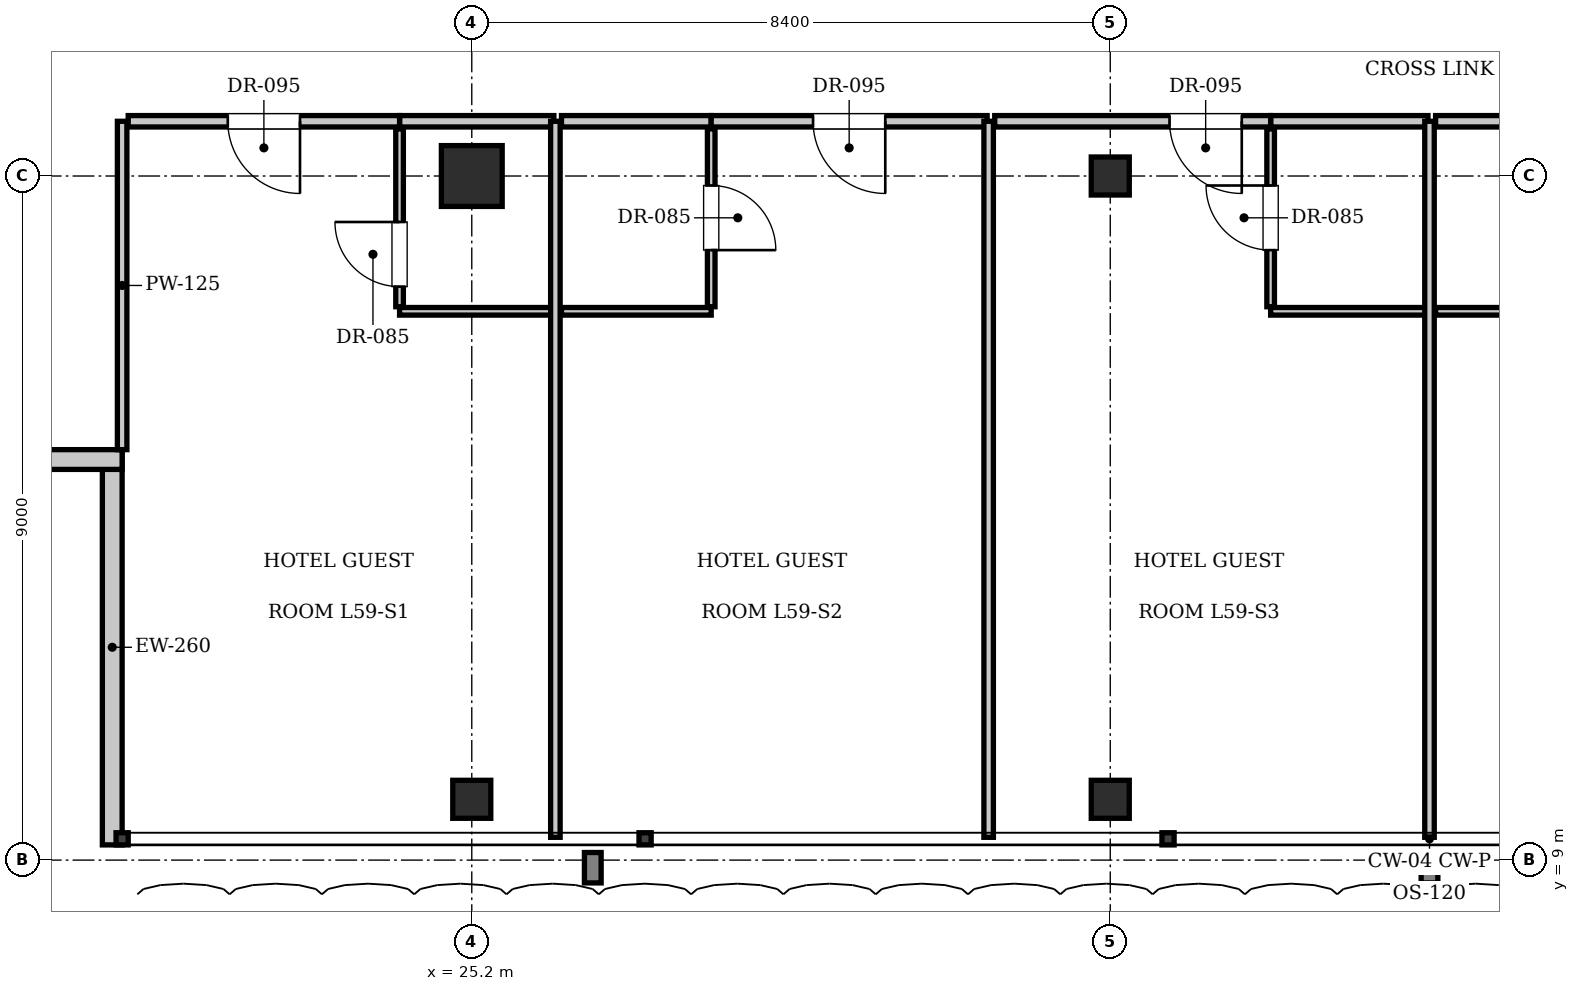
"""IFC4 building model, lengths in metres.
Left out: names, types, materials, properties, quantities, classifications, styles, units other than length and angle.
Written with IfcOpenShell. Run it as: python <this file> out.ifc"""

import sys

from ifc_helpers import new_model, si_unit, direction, frame, frame_2d, origin, origin_2d, place, context, subcontext, project, spatial, rectangle, i_section, extrude, element, fill, save


model = new_model("IFC4")
c1 = context("Model", 3, precision=1e-05, world=origin(), true_north=direction((0.0, 1.0)))
c2 = subcontext(c1, "Body", "Model", "MODEL_VIEW")
j1 = project(units=[si_unit("LENGTHUNIT", "METRE"), si_unit("PLANEANGLEUNIT", "RADIAN")], contexts=[c1])
p1 = place(None, origin())
s1 = spatial("IfcSite", under=j1, at=p1, CompositionType="ELEMENT")
p2 = place(p1, origin())
s2 = spatial("IfcBuilding", under=s1, at=p2, CompositionType="ELEMENT")
p3 = place(p2, frame((0.0, 0.0, 243.25)))
s3 = spatial("IfcBuildingStorey", under=s2, at=p3, CompositionType="ELEMENT", Elevation=243.25)
p4 = place(p3, frame((25.2, 18.0, 0.0), z_axis=(0.0, 0.0, 1.0), x_axis=(1.0, 0.0, 0.0)))
e1 = element("IfcColumn", 1, at=p4, inside=s3, PredefinedType="COLUMN", context=c2, shape_type="SweptSolid", body=[
    extrude(rectangle(XDim=0.8, YDim=0.8, at=origin_2d()), origin(), (0.0, 0.0, 1.0), 3.85),
])
for number, where, z_axis, x_axis in (
    (2, (33.6, 18.0, 0.0), (0.0, 0.0, 1.0), (1.0, 0.0, 0.0)),
    (3, (25.2, 9.8, 0.0), (0.0, 0.0, 1.0), (1.0, 0.0, 0.0)),
    (4, (33.6, 9.8, 0.0), (0.0, 0.0, 1.0), (1.0, 0.0, 0.0)),
):
    element("IfcColumn", number, at=place(p3, frame(where, z_axis=z_axis, x_axis=x_axis)), inside=s3, PredefinedType="COLUMN", context=c2, shape_type="SweptSolid", body=[
        extrude(i_section(OverallWidth=0.5, OverallDepth=0.5, WebThickness=0.022, FlangeThickness=0.032, at=origin_2d()), origin(), (0.0, 0.0, 1.0), 3.85),
    ])
p5 = place(p3, frame((20.47, 9.2, 0.0), z_axis=(0.0, 0.0, 1.0), x_axis=(0.0, 1.0, 0.0)))
e5 = element("IfcWall", 5, at=p5, inside=s3, PredefinedType="SOLIDWALL", context=c2, shape_type="SweptSolid", body=[
    extrude(rectangle(XDim=5.2, YDim=0.26, at=frame_2d((2.6, 0.0))), origin(), (0.0, 0.0, 1.0), 3.61),
])
p6 = place(p3, frame((20.6, 14.27, 0.0), z_axis=(0.0, 0.0, 1.0), x_axis=(-1.0, 0.0, 0.0)))
e6 = element("IfcWall", 6, at=p6, inside=s3, PredefinedType="SOLIDWALL", context=c2, shape_type="SweptSolid", body=[
    extrude(rectangle(XDim=5.2, YDim=0.26, at=frame_2d((2.6, 0.0))), origin(), (0.0, 0.0, 1.0), 3.61),
])
p7 = place(p6, frame((1.6, 0.0, 0.9)))
e7 = element("IfcOpeningElement", 7, at=p7, cuts=e6, PredefinedType="OPENING", context=c2, shape_type="SweptSolid", body=[
    extrude(rectangle(XDim=2.0, YDim=2.2, at=frame_2d((1.0, 1.1))), frame((0.0, 0.14, 0.0), z_axis=(0.0, -1.0, 0.0), x_axis=(1.0, 0.0, 0.0)), (0.0, 0.0, 1.0), 0.28),
])
p8 = place(p3, frame((20.6, 14.4, 0.0), z_axis=(0.0, 0.0, 1.0), x_axis=(0.0, 1.0, 0.0)))
e8 = element("IfcWall", 8, at=p8, inside=s3, PredefinedType="PARTITIONING", context=c2, shape_type="SweptSolid", body=[
    extrude(rectangle(XDim=4.32, YDim=0.125, at=frame_2d((2.16, 0.0))), origin(), (0.0, 0.0, 1.0), 3.61),
])
p9 = place(p3, frame((24.25, 18.72, 0.0), z_axis=(0.0, 0.0, 1.0), x_axis=(1.0, 0.0, 0.0)))
e9 = element("IfcWall", 9, at=p9, inside=s3, PredefinedType="PARTITIONING", context=c2, shape_type="SweptSolid", body=[
    extrude(rectangle(XDim=2.03, YDim=0.15, at=frame_2d((1.015, 0.0))), origin(), (0.0, 0.0, 1.0), 3.61),
])
p10 = place(p3, frame((24.25, 16.22, 0.0), z_axis=(0.0, 0.0, 1.0), x_axis=(1.0, 0.0, 0.0)))
e10 = element("IfcWall", 10, at=p10, inside=s3, PredefinedType="PARTITIONING", context=c2, shape_type="SweptSolid", body=[
    extrude(rectangle(XDim=2.01, YDim=0.1, at=frame_2d((1.005, 0.0))), origin(), (0.0, 0.0, 1.0), 3.61),
])
p11 = place(p3, frame((24.25, 16.28, 0.0), z_axis=(0.0, 0.0, 1.0), x_axis=(0.0, 1.0, 0.0)))
e11 = element("IfcWall", 11, at=p11, inside=s3, PredefinedType="PARTITIONING", context=c2, shape_type="SweptSolid", body=[
    extrude(rectangle(XDim=2.34, YDim=0.1, at=frame_2d((1.17, 0.0))), origin(), (0.0, 0.0, 1.0), 3.61),
])
p12 = place(p11, frame((0.265, 0.0, 0.0)))
e12 = element("IfcOpeningElement", 12, at=p12, cuts=e11, PredefinedType="OPENING", context=c2, shape_type="SweptSolid", body=[
    extrude(rectangle(XDim=0.85, YDim=2.1, at=frame_2d((0.425, 1.05))), frame((0.0, 0.06, 0.0), z_axis=(0.0, -1.0, 0.0), x_axis=(1.0, 0.0, 0.0)), (0.0, 0.0, 1.0), 0.12),
])
p13 = place(p3, frame((20.68, 18.72, 0.0), z_axis=(0.0, 0.0, 1.0), x_axis=(1.0, 0.0, 0.0)))
e13 = element("IfcWall", 13, at=p13, inside=s3, PredefinedType="PARTITIONING", context=c2, shape_type="SweptSolid", body=[
    extrude(rectangle(XDim=3.57, YDim=0.15, at=frame_2d((1.785, 0.0))), origin(), (0.0, 0.0, 1.0), 3.61),
])
p14 = place(p13, frame((1.31, 0.0, 0.0)))
e14 = element("IfcOpeningElement", 14, at=p14, cuts=e13, PredefinedType="OPENING", context=c2, shape_type="SweptSolid", body=[
    extrude(rectangle(XDim=0.95, YDim=2.15, at=frame_2d((0.475, 1.075))), frame((0.0, 0.085, 0.0), z_axis=(0.0, -1.0, 0.0), x_axis=(1.0, 0.0, 0.0)), (0.0, 0.0, 1.0), 0.17),
])
p15 = place(p3, frame((26.3, 9.3, 0.0), z_axis=(0.0, 0.0, 1.0), x_axis=(0.0, 1.0, 0.0)))
e15 = element("IfcWall", 15, at=p15, inside=s3, PredefinedType="PARTITIONING", context=c2, shape_type="SweptSolid", body=[
    extrude(rectangle(XDim=9.42, YDim=0.125, at=frame_2d((4.71, 0.0))), origin(), (0.0, 0.0, 1.0), 3.61),
])
p16 = place(p3, frame((26.38, 18.72, 0.0), z_axis=(0.0, 0.0, 1.0), x_axis=(1.0, 0.0, 0.0)))
e16 = element("IfcWall", 16, at=p16, inside=s3, PredefinedType="PARTITIONING", context=c2, shape_type="SweptSolid", body=[
    extrude(rectangle(XDim=1.97, YDim=0.15, at=frame_2d((0.985, 0.0))), origin(), (0.0, 0.0, 1.0), 3.61),
])
p17 = place(p3, frame((26.38, 16.22, 0.0), z_axis=(0.0, 0.0, 1.0), x_axis=(1.0, 0.0, 0.0)))
e17 = element("IfcWall", 17, at=p17, inside=s3, PredefinedType="PARTITIONING", context=c2, shape_type="SweptSolid", body=[
    extrude(rectangle(XDim=1.97, YDim=0.1, at=frame_2d((0.985, 0.0))), origin(), (0.0, 0.0, 1.0), 3.61),
])
p18 = place(p3, frame((28.35, 16.28, 0.0), z_axis=(0.0, 0.0, 1.0), x_axis=(0.0, 1.0, 0.0)))
e18 = element("IfcWall", 18, at=p18, inside=s3, PredefinedType="PARTITIONING", context=c2, shape_type="SweptSolid", body=[
    extrude(rectangle(XDim=2.34, YDim=0.1, at=frame_2d((1.17, 0.0))), origin(), (0.0, 0.0, 1.0), 3.61),
])
p19 = place(p18, frame((0.745, 0.0, 0.0)))
e19 = element("IfcOpeningElement", 19, at=p19, cuts=e18, PredefinedType="OPENING", context=c2, shape_type="SweptSolid", body=[
    extrude(rectangle(XDim=0.85, YDim=2.1, at=frame_2d((0.425, 1.05))), frame((0.0, 0.06, 0.0), z_axis=(0.0, -1.0, 0.0), x_axis=(1.0, 0.0, 0.0)), (0.0, 0.0, 1.0), 0.12),
])
p20 = place(p3, frame((28.35, 18.72, 0.0), z_axis=(0.0, 0.0, 1.0), x_axis=(1.0, 0.0, 0.0)))
e20 = element("IfcWall", 20, at=p20, inside=s3, PredefinedType="PARTITIONING", context=c2, shape_type="SweptSolid", body=[
    extrude(rectangle(XDim=3.63, YDim=0.15, at=frame_2d((1.815, 0.0))), origin(), (0.0, 0.0, 1.0), 3.61),
])
p21 = place(p20, frame((1.34, 0.0, 0.0)))
e21 = element("IfcOpeningElement", 21, at=p21, cuts=e20, PredefinedType="OPENING", context=c2, shape_type="SweptSolid", body=[
    extrude(rectangle(XDim=0.95, YDim=2.15, at=frame_2d((0.475, 1.075))), frame((0.0, 0.085, 0.0), z_axis=(0.0, -1.0, 0.0), x_axis=(1.0, 0.0, 0.0)), (0.0, 0.0, 1.0), 0.17),
])
p22 = place(p3, frame((32.0, 9.3, 0.0), z_axis=(0.0, 0.0, 1.0), x_axis=(0.0, 1.0, 0.0)))
e22 = element("IfcWall", 22, at=p22, inside=s3, PredefinedType="PARTITIONING", context=c2, shape_type="SweptSolid", body=[
    extrude(rectangle(XDim=9.42, YDim=0.125, at=frame_2d((4.71, 0.0))), origin(), (0.0, 0.0, 1.0), 3.61),
])
p23 = place(p3, frame((35.71, 18.72, 0.0), z_axis=(0.0, 0.0, 1.0), x_axis=(1.0, 0.0, 0.0)))
e23 = element("IfcWall", 23, at=p23, inside=s3, PredefinedType="PARTITIONING", context=c2, shape_type="SweptSolid", body=[
    extrude(rectangle(XDim=2.07, YDim=0.15, at=frame_2d((1.035, 0.0))), origin(), (0.0, 0.0, 1.0), 3.61),
])
p24 = place(p3, frame((35.71, 16.22, 0.0), z_axis=(0.0, 0.0, 1.0), x_axis=(1.0, 0.0, 0.0)))
e24 = element("IfcWall", 24, at=p24, inside=s3, PredefinedType="PARTITIONING", context=c2, shape_type="SweptSolid", body=[
    extrude(rectangle(XDim=2.05, YDim=0.1, at=frame_2d((1.025, 0.0))), origin(), (0.0, 0.0, 1.0), 3.61),
])
p25 = place(p3, frame((35.71, 16.28, 0.0), z_axis=(0.0, 0.0, 1.0), x_axis=(0.0, 1.0, 0.0)))
e25 = element("IfcWall", 25, at=p25, inside=s3, PredefinedType="PARTITIONING", context=c2, shape_type="SweptSolid", body=[
    extrude(rectangle(XDim=2.34, YDim=0.1, at=frame_2d((1.17, 0.0))), origin(), (0.0, 0.0, 1.0), 3.61),
])
p26 = place(p25, frame((0.745, 0.0, 0.0)))
e26 = element("IfcOpeningElement", 26, at=p26, cuts=e25, PredefinedType="OPENING", context=c2, shape_type="SweptSolid", body=[
    extrude(rectangle(XDim=0.85, YDim=2.1, at=frame_2d((0.425, 1.05))), frame((0.0, 0.06, 0.0), z_axis=(0.0, -1.0, 0.0), x_axis=(1.0, 0.0, 0.0)), (0.0, 0.0, 1.0), 0.12),
])
p27 = place(p3, frame((32.08, 18.72, 0.0), z_axis=(0.0, 0.0, 1.0), x_axis=(1.0, 0.0, 0.0)))
e27 = element("IfcWall", 27, at=p27, inside=s3, PredefinedType="PARTITIONING", context=c2, shape_type="SweptSolid", body=[
    extrude(rectangle(XDim=3.63, YDim=0.15, at=frame_2d((1.815, 0.0))), origin(), (0.0, 0.0, 1.0), 3.61),
])
p28 = place(p27, frame((2.3, 0.0, 0.0)))
e28 = element("IfcOpeningElement", 28, at=p28, cuts=e27, PredefinedType="OPENING", context=c2, shape_type="SweptSolid", body=[
    extrude(rectangle(XDim=0.95, YDim=2.15, at=frame_2d((0.475, 1.075))), frame((0.0, 0.085, 0.0), z_axis=(0.0, -1.0, 0.0), x_axis=(1.0, 0.0, 0.0)), (0.0, 0.0, 1.0), 0.17),
])
p29 = place(p3, frame((37.8, 9.3, 0.0), z_axis=(0.0, 0.0, 1.0), x_axis=(0.0, 1.0, 0.0)))
e29 = element("IfcWall", 29, at=p29, inside=s3, PredefinedType="PARTITIONING", context=c2, shape_type="SweptSolid", body=[
    extrude(rectangle(XDim=9.42, YDim=0.125, at=frame_2d((4.71, 0.0))), origin(), (0.0, 0.0, 1.0), 3.3),
])
p30 = place(p3, frame((37.88, 18.72, 0.0), z_axis=(0.0, 0.0, 1.0), x_axis=(1.0, 0.0, 0.0)))
e30 = element("IfcWall", 30, at=p30, inside=s3, PredefinedType="PARTITIONING", context=c2, shape_type="SweptSolid", body=[
    extrude(rectangle(XDim=2.01, YDim=0.15, at=frame_2d((1.005, 0.0))), origin(), (0.0, 0.0, 1.0), 3.61),
])
p31 = place(p3, frame((37.88, 16.22, 0.0), z_axis=(0.0, 0.0, 1.0), x_axis=(1.0, 0.0, 0.0)))
e31 = element("IfcWall", 31, at=p31, inside=s3, PredefinedType="PARTITIONING", context=c2, shape_type="SweptSolid", body=[
    extrude(rectangle(XDim=2.01, YDim=0.1, at=frame_2d((1.005, 0.0))), origin(), (0.0, 0.0, 1.0), 3.61),
])
p32 = place(p12, origin())
e32 = element("IfcDoor", 32, at=p32, inside=s3, OperationType="SINGLE_SWING_RIGHT", PredefinedType="DOOR", context=c2, shape_type="SweptSolid", body=[
    extrude(rectangle(XDim=0.85, YDim=2.1, at=frame_2d((0.425, 1.05))), frame((0.0, 0.025, 0.0), z_axis=(0.0, -1.0, 0.0), x_axis=(1.0, 0.0, 0.0)), (0.0, 0.0, 1.0), 0.05),
])
fill(e12, e32)
p33 = place(p14, frame((0.95, 0.0, 0.0), z_axis=(0.0, 0.0, 1.0), x_axis=(-1.0, 0.0, 0.0)))
e33 = element("IfcDoor", 33, at=p33, inside=s3, OperationType="SINGLE_SWING_LEFT", PredefinedType="DOOR", context=c2, shape_type="SweptSolid", body=[
    extrude(rectangle(XDim=0.95, YDim=2.15, at=frame_2d((0.475, 1.075))), frame((0.0, 0.025, 0.0), z_axis=(0.0, -1.0, 0.0), x_axis=(1.0, 0.0, 0.0)), (0.0, 0.0, 1.0), 0.05),
])
fill(e14, e33)
p34 = place(p19, frame((0.85, 0.0, 0.0), z_axis=(0.0, 0.0, 1.0), x_axis=(-1.0, 0.0, 0.0)))
e34 = element("IfcDoor", 34, at=p34, inside=s3, OperationType="SINGLE_SWING_RIGHT", PredefinedType="DOOR", context=c2, shape_type="SweptSolid", body=[
    extrude(rectangle(XDim=0.85, YDim=2.1, at=frame_2d((0.425, 1.05))), frame((0.0, 0.025, 0.0), z_axis=(0.0, -1.0, 0.0), x_axis=(1.0, 0.0, 0.0)), (0.0, 0.0, 1.0), 0.05),
])
fill(e19, e34)
p35 = place(p21, frame((0.95, 0.0, 0.0), z_axis=(0.0, 0.0, 1.0), x_axis=(-1.0, 0.0, 0.0)))
e35 = element("IfcDoor", 35, at=p35, inside=s3, OperationType="SINGLE_SWING_LEFT", PredefinedType="DOOR", context=c2, shape_type="SweptSolid", body=[
    extrude(rectangle(XDim=0.95, YDim=2.15, at=frame_2d((0.475, 1.075))), frame((0.0, 0.025, 0.0), z_axis=(0.0, -1.0, 0.0), x_axis=(1.0, 0.0, 0.0)), (0.0, 0.0, 1.0), 0.05),
])
fill(e21, e35)
p36 = place(p26, origin())
e36 = element("IfcDoor", 36, at=p36, inside=s3, OperationType="SINGLE_SWING_RIGHT", PredefinedType="DOOR", context=c2, shape_type="SweptSolid", body=[
    extrude(rectangle(XDim=0.85, YDim=2.1, at=frame_2d((0.425, 1.05))), frame((0.0, 0.025, 0.0), z_axis=(0.0, -1.0, 0.0), x_axis=(1.0, 0.0, 0.0)), (0.0, 0.0, 1.0), 0.05),
])
fill(e26, e36)
p37 = place(p28, frame((0.95, 0.0, 0.0), z_axis=(0.0, 0.0, 1.0), x_axis=(-1.0, 0.0, 0.0)))
e37 = element("IfcDoor", 37, at=p37, inside=s3, OperationType="SINGLE_SWING_LEFT", PredefinedType="DOOR", context=c2, shape_type="SweptSolid", body=[
    extrude(rectangle(XDim=0.95, YDim=2.15, at=frame_2d((0.475, 1.075))), frame((0.0, 0.025, 0.0), z_axis=(0.0, -1.0, 0.0), x_axis=(1.0, 0.0, 0.0)), (0.0, 0.0, 1.0), 0.05),
])
fill(e28, e37)
save(model, sys.argv[1])
